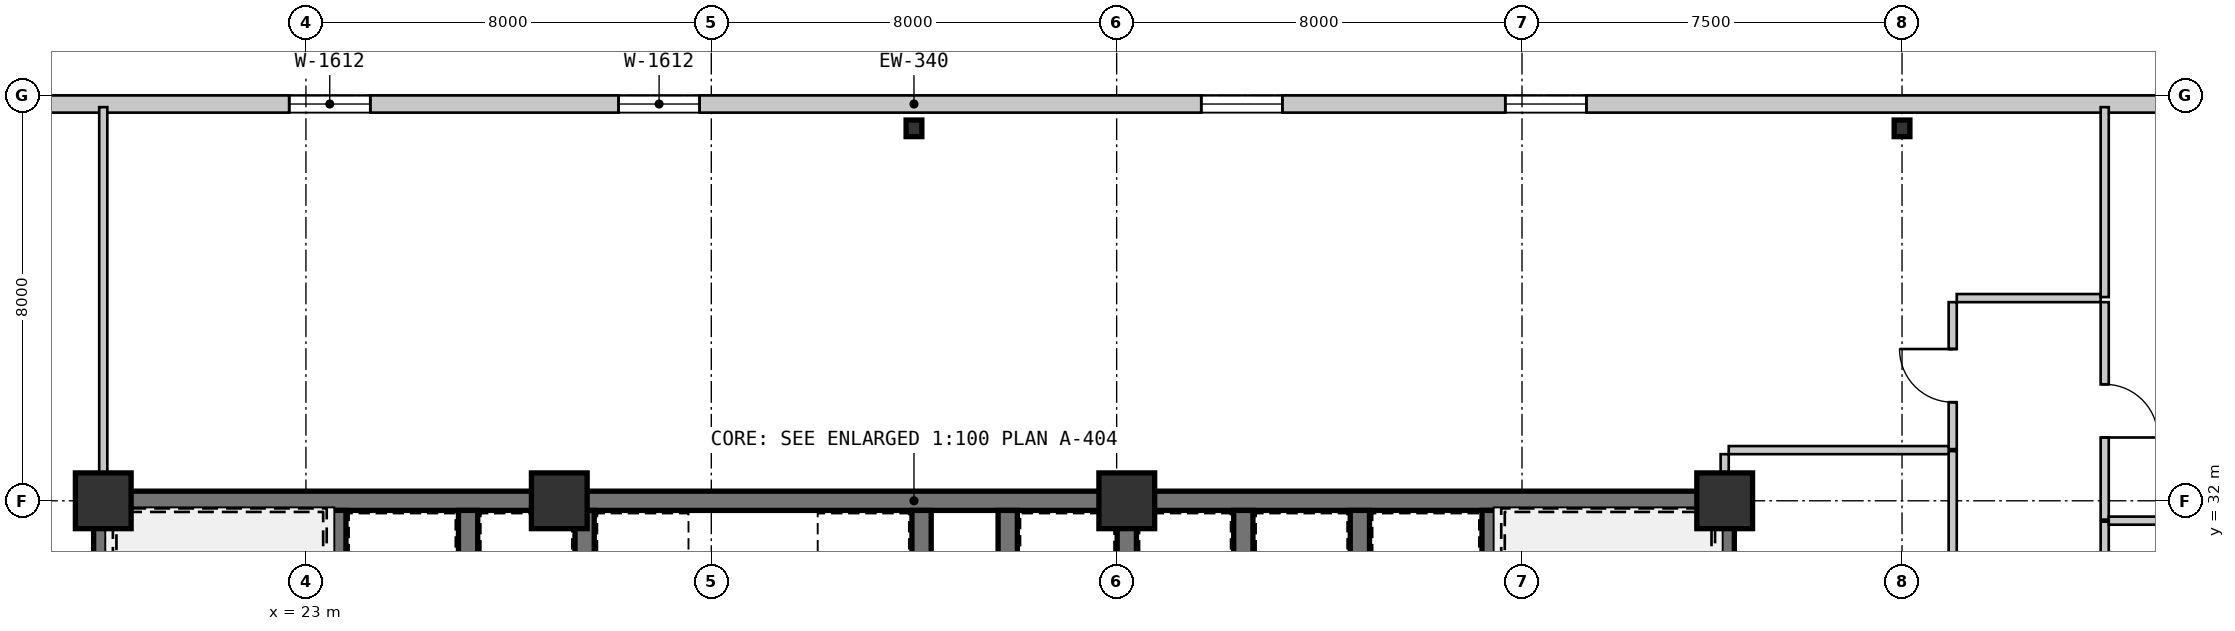
"""IFC4 building model, lengths in metres.
Left out: names, types, materials, properties, quantities, classifications, styles, units other than length and angle.
Written with IfcOpenShell. Run it as: python <this file> out.ifc"""

import sys

from ifc_helpers import new_model, si_unit, direction, frame, frame_2d, origin, origin_2d, place, context, subcontext, project, spatial, rectangle, i_section, extrude, source, transform, mapped, element, fill, save


model = new_model("IFC4")
c1 = context("Model", 3, precision=1e-05, world=origin(), true_north=direction((0.0, 1.0)))
c2 = subcontext(c1, "Body", "Model", "MODEL_VIEW")
j1 = project(units=[si_unit("LENGTHUNIT", "METRE"), si_unit("PLANEANGLEUNIT", "RADIAN")], contexts=[c1])
p1 = place(None, origin())
s1 = spatial("IfcSite", under=j1, at=p1, CompositionType="ELEMENT")
p2 = place(p1, origin())
s2 = spatial("IfcBuilding", under=s1, at=p2, CompositionType="ELEMENT")
p3 = place(p2, frame((0.0, 0.0, 4.55)))
s3 = spatial("IfcBuildingStorey", under=s2, at=p3, CompositionType="ELEMENT", Elevation=4.55)
m1 = source(origin(), c2, "Body", "SweptSolid", [
    extrude(rectangle(XDim=1.1, YDim=1.1, at=origin_2d()), origin(), (0.0, 0.0, 1.0), 3.85),
])
for number, where, z_axis, x_axis in (
    (1, (19.0, 32.0, 0.0), (0.0, 0.0, 1.0), (1.0, 0.0, 0.0)),
    (2, (28.0, 32.0, 0.0), (0.0, 0.0, 1.0), (1.0, 0.0, 0.0)),
    (3, (39.2, 32.0, 0.0), (0.0, 0.0, 1.0), (1.0, 0.0, 0.0)),
    (4, (51.0, 32.0, 0.0), (0.0, 0.0, 1.0), (1.0, 0.0, 0.0)),
):
    element("IfcColumn", number, at=place(p3, frame(where, z_axis=z_axis, x_axis=x_axis)), inside=s3, PredefinedType="COLUMN", context=c2, shape_type="MappedRepresentation", body=[
        mapped(m1, transform((0.0, 0.0, 0.0), scale=1.0)),
    ])
m2 = source(origin(), c2, "Body", "SweptSolid", [
    extrude(i_section(OverallWidth=0.311, OverallDepth=0.327, WebThickness=0.016, FlangeThickness=0.025, at=origin_2d()), origin(), (0.0, 0.0, 1.0), 3.85),
])
for number, where, z_axis, x_axis in (
    (5, (35.0, 39.35, 0.0), (0.0, 0.0, 1.0), (1.0, 0.0, 0.0)),
    (6, (54.5, 39.35, 0.0), (0.0, 0.0, 1.0), (1.0, 0.0, 0.0)),
):
    element("IfcColumn", number, at=place(p3, frame(where, z_axis=z_axis, x_axis=x_axis)), inside=s3, PredefinedType="COLUMN", context=c2, shape_type="MappedRepresentation", body=[
        mapped(m2, transform((0.0, 0.0, 0.0), scale=1.0)),
    ])
m3 = source(origin(), c2, "Body", "SweptSolid", [
    extrude(rectangle(XDim=69.66, YDim=0.34, at=frame_2d((34.83, 0.0))), origin(), (0.0, 0.0, 1.0), 3.59),
])
p4 = place(p3, frame((0.17, 39.83, 0.0), z_axis=(0.0, 0.0, 1.0), x_axis=(1.0, 0.0, 0.0)))
e7 = element("IfcWall", 7, at=p4, inside=s3, PredefinedType="SOLIDWALL", context=c2, shape_type="MappedRepresentation", body=[
    mapped(m3, transform((0.0, 0.0, 0.0), scale=1.0)),
])
m4 = source(origin(), c2, "Body", "SweptSolid", [
    extrude(rectangle(XDim=1.6, YDim=1.2, at=frame_2d((0.8, 0.6))), frame((0.0, 0.18, 0.0), z_axis=(0.0, -1.0, 0.0), x_axis=(1.0, 0.0, 0.0)), (0.0, 0.0, 1.0), 0.36),
])
p5 = place(p4, frame((4.5, 0.0, 0.95)))
e8 = element("IfcOpeningElement", 8, at=p5, cuts=e7, PredefinedType="OPENING", context=c2, shape_type="MappedRepresentation", body=[
    mapped(m4, transform((0.0, 0.0, 0.0), scale=1.0)),
])
p6 = place(p4, frame((22.5, 0.0, 0.95)))
e9 = element("IfcOpeningElement", 9, at=p6, cuts=e7, PredefinedType="OPENING", context=c2, shape_type="MappedRepresentation", body=[
    mapped(m4, transform((0.0, 0.0, 0.0), scale=1.0)),
])
p7 = place(p4, frame((29.0, 0.0, 0.95)))
e10 = element("IfcOpeningElement", 10, at=p7, cuts=e7, PredefinedType="OPENING", context=c2, shape_type="MappedRepresentation", body=[
    mapped(m4, transform((0.0, 0.0, 0.0), scale=1.0)),
])
p8 = place(p4, frame((40.5, 0.0, 0.95)))
e11 = element("IfcOpeningElement", 11, at=p8, cuts=e7, PredefinedType="OPENING", context=c2, shape_type="MappedRepresentation", body=[
    mapped(m4, transform((0.0, 0.0, 0.0), scale=1.0)),
])
p9 = place(p4, frame((46.5, 0.0, 0.95)))
e12 = element("IfcOpeningElement", 12, at=p9, cuts=e7, PredefinedType="OPENING", context=c2, shape_type="MappedRepresentation", body=[
    mapped(m4, transform((0.0, 0.0, 0.0), scale=1.0)),
])
p10 = place(p4, frame((62.5, 0.0, 0.95)))
e13 = element("IfcOpeningElement", 13, at=p10, cuts=e7, PredefinedType="OPENING", context=c2, shape_type="MappedRepresentation", body=[
    mapped(m4, transform((0.0, 0.0, 0.0), scale=1.0)),
])
m5 = source(origin(), c2, "Body", "SweptSolid", [
    extrude(rectangle(XDim=9.19, YDim=0.38, at=frame_2d((4.595, 0.0))), origin(), (0.0, 0.0, 1.0), 3.59),
])
p11 = place(p3, frame((18.81, 32.0, 0.0), z_axis=(0.0, 0.0, 1.0), x_axis=(1.0, 0.0, 0.0)))
e14 = element("IfcWall", 14, at=p11, inside=s3, PredefinedType="SHEAR", context=c2, shape_type="MappedRepresentation", body=[
    mapped(m5, transform((0.0, 0.0, 0.0), scale=1.0)),
])
m6 = source(origin(), c2, "Body", "SweptSolid", [
    extrude(rectangle(XDim=11.2, YDim=0.38, at=frame_2d((5.6, 0.0))), origin(), (0.0, 0.0, 1.0), 3.59),
])
p12 = place(p3, frame((28.0, 32.0, 0.0), z_axis=(0.0, 0.0, 1.0), x_axis=(1.0, 0.0, 0.0)))
e15 = element("IfcWall", 15, at=p12, inside=s3, PredefinedType="SHEAR", context=c2, shape_type="MappedRepresentation", body=[
    mapped(m6, transform((0.0, 0.0, 0.0), scale=1.0)),
])
m7 = source(origin(), c2, "Body", "SweptSolid", [
    extrude(rectangle(XDim=11.99, YDim=0.38, at=frame_2d((5.995, 0.0))), origin(), (0.0, 0.0, 1.0), 3.59),
])
p13 = place(p3, frame((39.2, 32.0, 0.0), z_axis=(0.0, 0.0, 1.0), x_axis=(1.0, 0.0, 0.0)))
e16 = element("IfcWall", 16, at=p13, inside=s3, PredefinedType="SHEAR", context=c2, shape_type="MappedRepresentation", body=[
    mapped(m7, transform((0.0, 0.0, 0.0), scale=1.0)),
])
m8 = source(origin(), c2, "Body", "SweptSolid", [
    extrude(rectangle(XDim=3.61, YDim=0.38, at=frame_2d((1.805, 0.0))), origin(), (0.0, 0.0, 1.0), 3.59),
])
for number, where, z_axis, x_axis in (
    (17, (19.0, 28.2, 0.0), (0.0, 0.0, 1.0), (0.0, 1.0, 0.0)),
    (18, (51.0, 28.2, 0.0), (0.0, 0.0, 1.0), (0.0, 1.0, 0.0)),
):
    element("IfcWall", number, at=place(p3, frame(where, z_axis=z_axis, x_axis=x_axis)), inside=s3, PredefinedType="SHEAR", context=c2, shape_type="MappedRepresentation", body=[
        mapped(m8, transform((0.0, 0.0, 0.0), scale=1.0)),
    ])
m9 = source(origin(), c2, "Body", "SweptSolid", [
    extrude(rectangle(XDim=3.42, YDim=0.38, at=frame_2d((1.71, 0.0))), origin(), (0.0, 0.0, 1.0), 3.59),
])
for number, where, z_axis, x_axis in (
    (19, (23.6, 28.39, 0.0), (0.0, 0.0, 1.0), (0.0, 1.0, 0.0)),
    (20, (26.2, 28.39, 0.0), (0.0, 0.0, 1.0), (0.0, 1.0, 0.0)),
    (21, (46.4, 31.81, 0.0), (0.0, 0.0, 1.0), (0.0, -1.0, 0.0)),
    (22, (43.8, 31.81, 0.0), (0.0, 0.0, 1.0), (0.0, -1.0, 0.0)),
):
    element("IfcWall", number, at=place(p3, frame(where, z_axis=z_axis, x_axis=x_axis)), inside=s3, PredefinedType="SHEAR", context=c2, shape_type="MappedRepresentation", body=[
        mapped(m9, transform((0.0, 0.0, 0.0), scale=1.0)),
    ])
m10 = source(origin(), c2, "Body", "SweptSolid", [
    extrude(rectangle(XDim=1.12, YDim=0.38, at=frame_2d((0.56, 0.0))), origin(), (0.0, 0.0, 1.0), 3.59),
])
for number, where, z_axis, x_axis in (
    (23, (35.15, 31.81, 0.0), (0.0, 0.0, 1.0), (0.0, -1.0, 0.0)),
    (24, (36.85, 30.69, 0.0), (0.0, 0.0, 1.0), (0.0, 1.0, 0.0)),
):
    element("IfcWall", number, at=place(p3, frame(where, z_axis=z_axis, x_axis=x_axis)), inside=s3, PredefinedType="SHEAR", context=c2, shape_type="MappedRepresentation", body=[
        mapped(m10, transform((0.0, 0.0, 0.0), scale=1.0)),
    ])
for number, where, z_axis, x_axis in (
    (25, (28.5, 28.39, 0.0), (0.0, 0.0, 1.0), (0.0, 1.0, 0.0)),
    (26, (39.2, 28.39, 0.0), (0.0, 0.0, 1.0), (0.0, 1.0, 0.0)),
    (27, (41.5, 28.39, 0.0), (0.0, 0.0, 1.0), (0.0, 1.0, 0.0)),
):
    element("IfcWall", number, at=place(p3, frame(where, z_axis=z_axis, x_axis=x_axis)), inside=s3, PredefinedType="SHEAR", context=c2, shape_type="MappedRepresentation", body=[
        mapped(m9, transform((0.0, 0.0, 0.0), scale=1.0)),
    ])
m11 = source(origin(), c2, "Body", "SweptSolid", [
    extrude(rectangle(XDim=7.508, YDim=0.16, at=frame_2d((3.754, 0.0))), origin(), (0.0, 0.0, 1.0), 3.59),
])
p14 = place(p3, frame((58.5, 31.588, 0.0), z_axis=(0.0, 0.0, 1.0), x_axis=(0.0, -1.0, 0.0)))
e28 = element("IfcWall", 28, at=p14, inside=s3, PredefinedType="PARTITIONING", context=c2, shape_type="MappedRepresentation", body=[
    mapped(m11, transform((0.0, 0.0, 0.0), scale=1.0)),
])
m12 = source(origin(), c2, "Body", "SweptSolid", [
    extrude(rectangle(XDim=4.292, YDim=0.16, at=frame_2d((2.146, 0.0))), origin(), (0.0, 0.0, 1.0), 3.59),
])
p15 = place(p3, frame((58.5, 35.92, 0.0), z_axis=(0.0, 0.0, 1.0), x_axis=(0.0, -1.0, 0.0)))
e29 = element("IfcWall", 29, at=p15, inside=s3, PredefinedType="PARTITIONING", context=c2, shape_type="MappedRepresentation", body=[
    mapped(m12, transform((0.0, 0.0, 0.0), scale=1.0)),
])
m13 = source(origin(), c2, "Body", "SweptSolid", [
    extrude(rectangle(XDim=1.05, YDim=2.1, at=frame_2d((0.525, 1.05))), frame((0.0, 0.09, 0.0), z_axis=(0.0, -1.0, 0.0), x_axis=(1.0, 0.0, 0.0)), (0.0, 0.0, 1.0), 0.18),
])
p16 = place(p15, frame((1.621, 0.0, 0.0)))
e30 = element("IfcOpeningElement", 30, at=p16, cuts=e29, PredefinedType="OPENING", context=c2, shape_type="MappedRepresentation", body=[
    mapped(m13, transform((0.0, 0.0, 0.0), scale=1.0)),
])
m14 = source(origin(), c2, "Body", "SweptSolid", [
    extrude(rectangle(XDim=8.9, YDim=0.16, at=frame_2d((4.45, 0.0))), origin(), (0.0, 0.0, 1.0), 3.59),
])
p17 = place(p3, frame((55.5, 24.08, 0.0), z_axis=(0.0, 0.0, 1.0), x_axis=(0.0, 1.0, 0.0)))
e31 = element("IfcWall", 31, at=p17, inside=s3, PredefinedType="PARTITIONING", context=c2, shape_type="MappedRepresentation", body=[
    mapped(m14, transform((0.0, 0.0, 0.0), scale=1.0)),
])
p18 = place(p17, frame((3.895, 0.0, 0.0)))
e32 = element("IfcOpeningElement", 32, at=p18, cuts=e31, PredefinedType="OPENING", context=c2, shape_type="MappedRepresentation", body=[
    mapped(m13, transform((0.0, 0.0, 0.0), scale=1.0)),
])
m15 = source(origin(), c2, "Body", "SweptSolid", [
    extrude(rectangle(XDim=2.9, YDim=0.16, at=frame_2d((1.45, 0.0))), origin(), (0.0, 0.0, 1.0), 3.59),
])
p19 = place(p3, frame((55.5, 33.02, 0.0), z_axis=(0.0, 0.0, 1.0), x_axis=(0.0, 1.0, 0.0)))
e33 = element("IfcWall", 33, at=p19, inside=s3, PredefinedType="PARTITIONING", context=c2, shape_type="MappedRepresentation", body=[
    mapped(m15, transform((0.0, 0.0, 0.0), scale=1.0)),
])
p20 = place(p19, frame((0.925, 0.0, 0.0)))
e34 = element("IfcOpeningElement", 34, at=p20, cuts=e33, PredefinedType="OPENING", context=c2, shape_type="MappedRepresentation", body=[
    mapped(m13, transform((0.0, 0.0, 0.0), scale=1.0)),
])
m16 = source(origin(), c2, "Body", "SweptSolid", [
    extrude(rectangle(XDim=2.84, YDim=0.16, at=frame_2d((1.42, 0.0))), origin(), (0.0, 0.0, 1.0), 3.59),
])
p21 = place(p3, frame((55.58, 36.0, 0.0), z_axis=(0.0, 0.0, 1.0), x_axis=(1.0, 0.0, 0.0)))
e35 = element("IfcWall", 35, at=p21, inside=s3, PredefinedType="PARTITIONING", context=c2, shape_type="MappedRepresentation", body=[
    mapped(m16, transform((0.0, 0.0, 0.0), scale=1.0)),
])
m17 = source(origin(), c2, "Body", "SweptSolid", [
    extrude(rectangle(XDim=7.578, YDim=0.16, at=frame_2d((3.789, 0.0))), origin(), (0.0, 0.0, 1.0), 3.59),
])
p22 = place(p3, frame((19.0, 39.768, 0.0), z_axis=(0.0, 0.0, 1.0), x_axis=(0.0, -1.0, 0.0)))
e36 = element("IfcWall", 36, at=p22, inside=s3, PredefinedType="PARTITIONING", context=c2, shape_type="MappedRepresentation", body=[
    mapped(m17, transform((0.0, 0.0, 0.0), scale=1.0)),
])
m18 = source(origin(), c2, "Body", "SweptSolid", [
    extrude(rectangle(XDim=11.19, YDim=0.16, at=frame_2d((5.595, 0.0))), origin(), (0.0, 0.0, 1.0), 3.59),
])
p23 = place(p3, frame((58.58, 31.608, 0.0), z_axis=(0.0, 0.0, 1.0), x_axis=(1.0, 0.0, 0.0)))
e37 = element("IfcWall", 37, at=p23, inside=s3, PredefinedType="PARTITIONING", context=c2, shape_type="MappedRepresentation", body=[
    mapped(m18, transform((0.0, 0.0, 0.0), scale=1.0)),
])
m19 = source(origin(), c2, "Body", "SweptSolid", [
    extrude(rectangle(XDim=3.748, YDim=0.16, at=frame_2d((1.874, 0.0))), origin(), (0.0, 0.0, 1.0), 3.59),
])
p24 = place(p3, frame((58.5, 36.02, 0.0), z_axis=(0.0, 0.0, 1.0), x_axis=(0.0, 1.0, 0.0)))
e38 = element("IfcWall", 38, at=p24, inside=s3, PredefinedType="PARTITIONING", context=c2, shape_type="MappedRepresentation", body=[
    mapped(m19, transform((0.0, 0.0, 0.0), scale=1.0)),
])
m20 = source(origin(), c2, "Body", "SweptSolid", [
    extrude(rectangle(XDim=4.34, YDim=0.16, at=frame_2d((2.17, 0.0))), origin(), (0.0, 0.0, 1.0), 3.59),
])
p25 = place(p3, frame((51.08, 33.0, 0.0), z_axis=(0.0, 0.0, 1.0), x_axis=(1.0, 0.0, 0.0)))
e39 = element("IfcWall", 39, at=p25, inside=s3, PredefinedType="PARTITIONING", context=c2, shape_type="MappedRepresentation", body=[
    mapped(m20, transform((0.0, 0.0, 0.0), scale=1.0)),
])
m21 = source(origin(), c2, "Body", "SweptSolid", [
    extrude(rectangle(XDim=0.73, YDim=0.16, at=frame_2d((0.365, 0.0))), origin(), (0.0, 0.0, 1.0), 3.59),
])
p26 = place(p3, frame((51.0, 32.19, 0.0), z_axis=(0.0, 0.0, 1.0), x_axis=(0.0, 1.0, 0.0)))
e40 = element("IfcWall", 40, at=p26, inside=s3, PredefinedType="PARTITIONING", context=c2, shape_type="MappedRepresentation", body=[
    mapped(m21, transform((0.0, 0.0, 0.0), scale=1.0)),
])
m22 = source(origin(), c2, "Body", "SweptSolid", [
    extrude(rectangle(XDim=1.6, YDim=1.2, at=frame_2d((0.8, 0.6))), frame((0.0, 0.03, 0.0), z_axis=(0.0, -1.0, 0.0), x_axis=(1.0, 0.0, 0.0)), (0.0, 0.0, 1.0), 0.06),
])
p27 = place(p6, origin())
e41 = element("IfcWindow", 41, at=p27, inside=s3, PartitioningType="SINGLE_PANEL", PredefinedType="WINDOW", context=c2, shape_type="MappedRepresentation", body=[
    mapped(m22, transform((0.0, 0.0, 0.0), scale=1.0)),
])
fill(e9, e41)
p28 = place(p7, origin())
e42 = element("IfcWindow", 42, at=p28, inside=s3, PartitioningType="SINGLE_PANEL", PredefinedType="WINDOW", context=c2, shape_type="MappedRepresentation", body=[
    mapped(m22, transform((0.0, 0.0, 0.0), scale=1.0)),
])
fill(e10, e42)
p29 = place(p8, origin())
e43 = element("IfcWindow", 43, at=p29, inside=s3, PartitioningType="SINGLE_PANEL", PredefinedType="WINDOW", context=c2, shape_type="MappedRepresentation", body=[
    mapped(m22, transform((0.0, 0.0, 0.0), scale=1.0)),
])
fill(e11, e43)
p30 = place(p9, origin())
e44 = element("IfcWindow", 44, at=p30, inside=s3, PartitioningType="SINGLE_PANEL", PredefinedType="WINDOW", context=c2, shape_type="MappedRepresentation", body=[
    mapped(m22, transform((0.0, 0.0, 0.0), scale=1.0)),
])
fill(e12, e44)
m23 = source(origin(), c2, "Body", "SweptSolid", [
    extrude(rectangle(XDim=1.05, YDim=2.1, at=frame_2d((0.525, 1.05))), frame((0.0, 0.025, 0.0), z_axis=(0.0, -1.0, 0.0), x_axis=(1.0, 0.0, 0.0)), (0.0, 0.0, 1.0), 0.05),
])
p31 = place(p16, origin())
e45 = element("IfcDoor", 45, at=p31, inside=s3, OperationType="SINGLE_SWING_RIGHT", PredefinedType="DOOR", context=c2, shape_type="MappedRepresentation", body=[
    mapped(m23, transform((0.0, 0.0, 0.0), scale=1.0)),
])
fill(e30, e45)
p32 = place(p20, origin())
e46 = element("IfcDoor", 46, at=p32, inside=s3, OperationType="SINGLE_SWING_RIGHT", PredefinedType="DOOR", context=c2, shape_type="MappedRepresentation", body=[
    mapped(m23, transform((0.0, 0.0, 0.0), scale=1.0)),
])
fill(e34, e46)
save(model, sys.argv[1])
